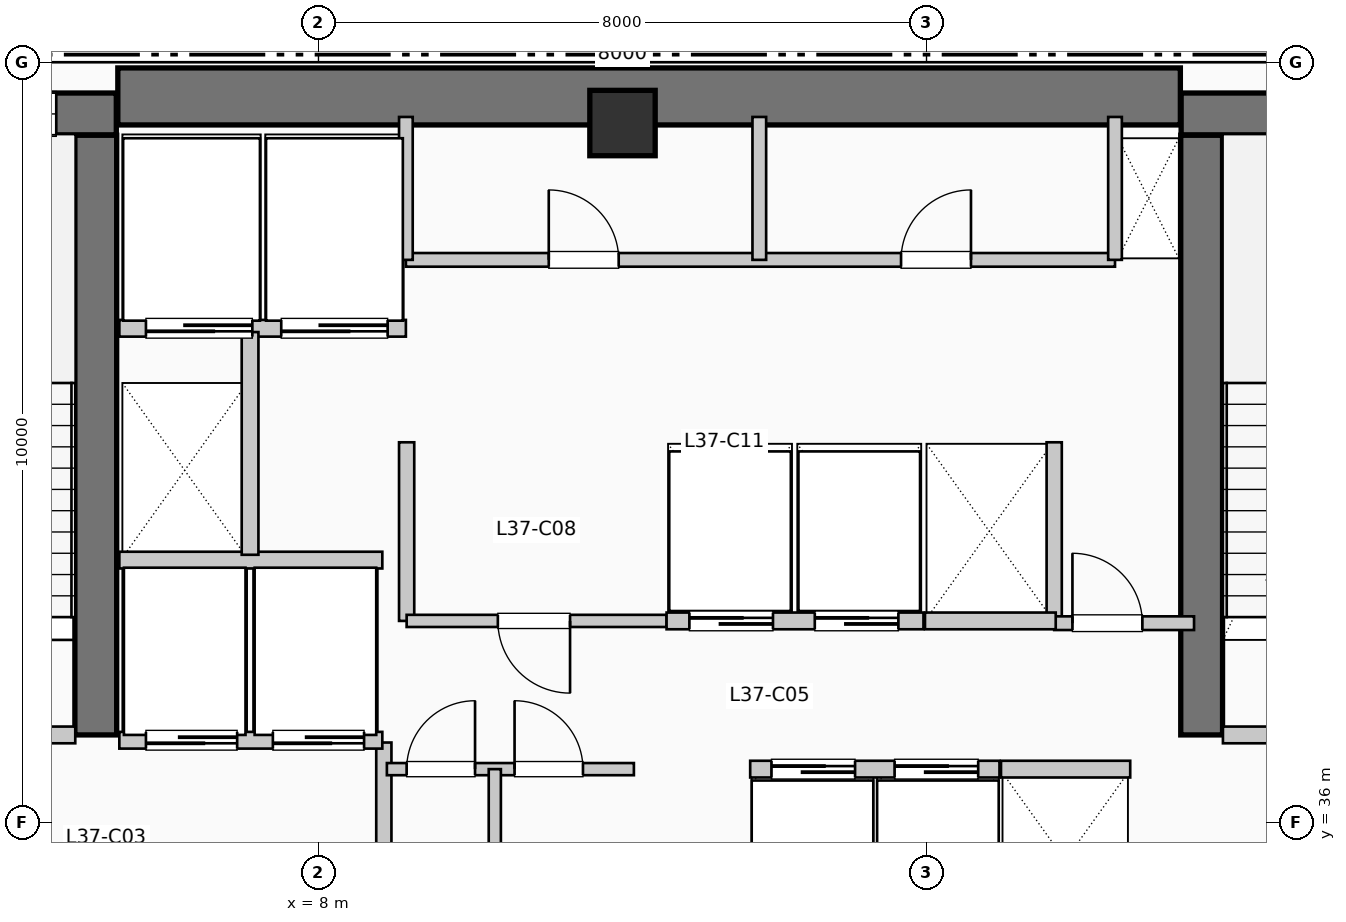
"""IFC4 building model, lengths in metres.
Left out: names, types, materials, properties, quantities, classifications, styles, units other than length and angle.
Written with IfcOpenShell. Run it as: python <this file> out.ifc"""

import sys

from ifc_helpers import new_model, si_unit, direction, frame, frame_2d, origin, origin_2d, place, context, subcontext, project, spatial, rectangle, extrude, element, fill, save


model = new_model("IFC4")
c1 = context("Model", 3, precision=1e-05, world=origin(), true_north=direction((0.0, 1.0)))
c2 = subcontext(c1, "Body", "Model", "MODEL_VIEW")
j1 = project(units=[si_unit("LENGTHUNIT", "METRE"), si_unit("PLANEANGLEUNIT", "RADIAN")], contexts=[c1])
p1 = place(None, origin())
s1 = spatial("IfcSite", under=j1, at=p1, CompositionType="ELEMENT")
p2 = place(p1, origin())
s2 = spatial("IfcBuilding", under=s1, at=p2, CompositionType="ELEMENT")
p3 = place(p2, frame((0.0, 0.0, 154.77)))
s3 = spatial("IfcBuildingStorey", under=s2, at=p3, CompositionType="ELEMENT", Elevation=154.77)
p4 = place(p3, frame((5.36, 45.55, 0.0), z_axis=(0.0, 0.0, 1.0), x_axis=(1.0, 0.0, 0.0)))
e1 = element("IfcWall", 1, at=p4, inside=s3, PredefinedType="SHEAR", context=c2, shape_type="SweptSolid", body=[
    extrude(rectangle(XDim=13.98, YDim=0.75, at=frame_2d((6.99, 0.0))), origin(), (0.0, 0.0, 1.0), 3.96),
])
p5 = place(p3, frame((5.07, 37.15, 0.0), z_axis=(0.0, 0.0, 1.0), x_axis=(0.0, 1.0, 0.0)))
e2 = element("IfcWall", 2, at=p5, inside=s3, PredefinedType="SHEAR", context=c2, shape_type="SweptSolid", body=[
    extrude(rectangle(XDim=7.89, YDim=0.55, at=frame_2d((3.945, 0.0))), origin(), (0.0, 0.0, 1.0), 3.96),
])
p6 = place(p3, frame((1.1, 45.32, 0.0), z_axis=(0.0, 0.0, 1.0), x_axis=(1.0, 0.0, 0.0)))
e3 = element("IfcWall", 3, at=p6, inside=s3, PredefinedType="SHEAR", context=c2, shape_type="SweptSolid", body=[
    extrude(rectangle(XDim=4.24, YDim=0.55, at=frame_2d((2.12, 0.0))), origin(), (0.0, 0.0, 1.0), 3.96),
])
p7 = place(p6, frame((2.05, 0.0, 1.05)))
e4 = element("IfcOpeningElement", 4, at=p7, cuts=e3, PredefinedType="OPENING", context=c2, shape_type="SweptSolid", body=[
    extrude(rectangle(XDim=1.4, YDim=1.8, at=frame_2d((0.7, 0.9))), frame((0.0, 0.285, 0.0), z_axis=(0.0, -1.0, 0.0), x_axis=(1.0, 0.0, 0.0)), (0.0, 0.0, 1.0), 0.57),
])
p8 = place(p3, frame((19.62, 37.15, 0.0), z_axis=(0.0, 0.0, 1.0), x_axis=(0.0, 1.0, 0.0)))
e5 = element("IfcWall", 5, at=p8, inside=s3, PredefinedType="SHEAR", context=c2, shape_type="SweptSolid", body=[
    extrude(rectangle(XDim=7.89, YDim=0.55, at=frame_2d((3.945, 0.0))), origin(), (0.0, 0.0, 1.0), 3.96),
])
p9 = place(p3, frame((19.35, 45.32, 0.0), z_axis=(0.0, 0.0, 1.0), x_axis=(1.0, 0.0, 0.0)))
e6 = element("IfcWall", 6, at=p9, inside=s3, PredefinedType="SHEAR", context=c2, shape_type="SweptSolid", body=[
    extrude(rectangle(XDim=3.69, YDim=0.55, at=frame_2d((1.845, 0.0))), origin(), (0.0, 0.0, 1.0), 3.96),
])
p10 = place(p9, frame((1.15, 0.0, 1.05)))
e7 = element("IfcOpeningElement", 7, at=p10, cuts=e6, PredefinedType="OPENING", context=c2, shape_type="SweptSolid", body=[
    extrude(rectangle(XDim=1.4, YDim=1.8, at=frame_2d((0.7, 0.9))), frame((0.0, 0.285, 0.0), z_axis=(0.0, -1.0, 0.0), x_axis=(1.0, 0.0, 0.0)), (0.0, 0.0, 1.0), 0.57),
])
p11 = place(p3, frame((12.0, 45.2, 0.0), z_axis=(0.0, 0.0, 1.0), x_axis=(1.0, 0.0, 0.0)))
e8 = element("IfcColumn", 8, at=p11, inside=s3, PredefinedType="COLUMN", context=c2, shape_type="SweptSolid", body=[
    extrude(rectangle(XDim=0.86, YDim=0.86, at=origin_2d()), origin(), (0.0, 0.0, 1.0), 3.96),
])
p12 = place(p3, frame((1.65, 37.15, 0.0), z_axis=(0.0, 0.0, 1.0), x_axis=(1.0, 0.0, 0.0)))
e9 = element("IfcWall", 9, at=p12, inside=s3, PredefinedType="PARTITIONING", context=c2, shape_type="SweptSolid", body=[
    extrude(rectangle(XDim=3.15, YDim=0.22, at=frame_2d((1.575, 0.0))), origin(), (0.0, 0.0, 1.0), 3.71),
])
p13 = place(p12, frame((2.05, 0.0, 0.0), z_axis=(0.0, 0.0, 1.0), x_axis=(-1.0, 0.0, 0.0)))
e10 = element("IfcOpeningElement", 10, at=p13, cuts=e9, PredefinedType="OPENING", context=c2, shape_type="SweptSolid", body=[
    extrude(rectangle(XDim=1.05, YDim=2.15, at=frame_2d((0.525, 1.075))), frame((0.0, 0.12, 0.0), z_axis=(0.0, -1.0, 0.0), x_axis=(1.0, 0.0, 0.0)), (0.0, 0.0, 1.0), 0.24),
])
p14 = place(p3, frame((8.86, 34.55, 0.0), z_axis=(0.0, 0.0, 1.0), x_axis=(0.0, 1.0, 0.0)))
e11 = element("IfcWall", 11, at=p14, inside=s3, PredefinedType="PARTITIONING", context=c2, shape_type="SweptSolid", body=[
    extrude(rectangle(XDim=2.5, YDim=0.2, at=frame_2d((1.25, 0.0))), origin(), (0.0, 0.0, 1.0), 3.71),
])
p15 = place(p3, frame((19.9, 37.15, 0.0), z_axis=(0.0, 0.0, 1.0), x_axis=(1.0, 0.0, 0.0)))
e12 = element("IfcWall", 12, at=p15, inside=s3, PredefinedType="PARTITIONING", context=c2, shape_type="SweptSolid", body=[
    extrude(rectangle(XDim=3.15, YDim=0.22, at=frame_2d((1.575, 0.0))), origin(), (0.0, 0.0, 1.0), 3.71),
])
p16 = place(p15, frame((2.05, 0.0, 0.0), z_axis=(0.0, 0.0, 1.0), x_axis=(-1.0, 0.0, 0.0)))
e13 = element("IfcOpeningElement", 13, at=p16, cuts=e12, PredefinedType="OPENING", context=c2, shape_type="SweptSolid", body=[
    extrude(rectangle(XDim=1.05, YDim=2.15, at=frame_2d((0.525, 1.075))), frame((0.0, 0.12, 0.0), z_axis=(0.0, -1.0, 0.0), x_axis=(1.0, 0.0, 0.0)), (0.0, 0.0, 1.0), 0.24),
])
p17 = place(p3, frame((5.38, 37.08, 0.0), z_axis=(0.0, 0.0, 1.0), x_axis=(1.0, 0.0, 0.0)))
e14 = element("IfcWall", 14, at=p17, inside=s3, PredefinedType="PARTITIONING", context=c2, shape_type="SweptSolid", body=[
    extrude(rectangle(XDim=3.46, YDim=0.22, at=frame_2d((1.73, 0.0))), origin(), (0.0, 0.0, 1.0), 3.71),
])
p18 = place(p17, frame((1.55, 0.0, 0.0), z_axis=(0.0, 0.0, 1.0), x_axis=(-1.0, 0.0, 0.0)))
e15 = element("IfcOpeningElement", 15, at=p18, cuts=e14, PredefinedType="OPENING", context=c2, shape_type="SweptSolid", body=[
    extrude(rectangle(XDim=1.2, YDim=2.2, at=frame_2d((0.6, 1.1))), frame((0.0, 0.12, 0.0), z_axis=(0.0, -1.0, 0.0), x_axis=(1.0, 0.0, 0.0)), (0.0, 0.0, 1.0), 0.24),
])
p19 = place(p17, frame((3.22, 0.0, 0.0), z_axis=(0.0, 0.0, 1.0), x_axis=(-1.0, 0.0, 0.0)))
e16 = element("IfcOpeningElement", 16, at=p19, cuts=e14, PredefinedType="OPENING", context=c2, shape_type="SweptSolid", body=[
    extrude(rectangle(XDim=1.2, YDim=2.2, at=frame_2d((0.6, 1.1))), frame((0.0, 0.12, 0.0), z_axis=(0.0, -1.0, 0.0), x_axis=(1.0, 0.0, 0.0)), (0.0, 0.0, 1.0), 0.24),
])
p20 = place(p3, frame((5.38, 39.45, 0.0), z_axis=(0.0, 0.0, 1.0), x_axis=(1.0, 0.0, 0.0)))
e17 = element("IfcWall", 17, at=p20, inside=s3, PredefinedType="PARTITIONING", context=c2, shape_type="SweptSolid", body=[
    extrude(rectangle(XDim=3.46, YDim=0.22, at=frame_2d((1.73, 0.0))), origin(), (0.0, 0.0, 1.0), 3.71),
])
p21 = place(p3, frame((5.38, 42.5, 0.0), z_axis=(0.0, 0.0, 1.0), x_axis=(1.0, 0.0, 0.0)))
e18 = element("IfcWall", 18, at=p21, inside=s3, PredefinedType="PARTITIONING", context=c2, shape_type="SweptSolid", body=[
    extrude(rectangle(XDim=3.77, YDim=0.22, at=frame_2d((1.885, 0.0))), origin(), (0.0, 0.0, 1.0), 3.71),
])
p22 = place(p21, frame((1.75, 0.0, 0.0), z_axis=(0.0, 0.0, 1.0), x_axis=(-1.0, 0.0, 0.0)))
e19 = element("IfcOpeningElement", 19, at=p22, cuts=e18, PredefinedType="OPENING", context=c2, shape_type="SweptSolid", body=[
    extrude(rectangle(XDim=1.4, YDim=2.2, at=frame_2d((0.7, 1.1))), frame((0.0, 0.12, 0.0), z_axis=(0.0, -1.0, 0.0), x_axis=(1.0, 0.0, 0.0)), (0.0, 0.0, 1.0), 0.24),
])
p23 = place(p21, frame((3.53, 0.0, 0.0), z_axis=(0.0, 0.0, 1.0), x_axis=(-1.0, 0.0, 0.0)))
e20 = element("IfcOpeningElement", 20, at=p23, cuts=e18, PredefinedType="OPENING", context=c2, shape_type="SweptSolid", body=[
    extrude(rectangle(XDim=1.4, YDim=2.2, at=frame_2d((0.7, 1.1))), frame((0.0, 0.12, 0.0), z_axis=(0.0, -1.0, 0.0), x_axis=(1.0, 0.0, 0.0)), (0.0, 0.0, 1.0), 0.24),
])
p24 = place(p3, frame((7.1, 39.52, 0.0), z_axis=(0.0, 0.0, 1.0), x_axis=(0.0, 1.0, 0.0)))
e21 = element("IfcWall", 21, at=p24, inside=s3, PredefinedType="PARTITIONING", context=c2, shape_type="SweptSolid", body=[
    extrude(rectangle(XDim=2.93, YDim=0.22, at=frame_2d((1.465, 0.0))), origin(), (0.0, 0.0, 1.0), 3.71),
])
for number, where, z_axis, x_axis in (
    (22, (9.16, 38.65, 0.0), (0.0, 0.0, 1.0), (0.0, 1.0, 0.0)),
    (23, (17.68, 38.65, 0.0), (0.0, 0.0, 1.0), (0.0, 1.0, 0.0)),
):
    element("IfcWall", number, at=place(p3, frame(where, z_axis=z_axis, x_axis=x_axis)), inside=s3, PredefinedType="PARTITIONING", context=c2, shape_type="SweptSolid", body=[
        extrude(rectangle(XDim=2.35, YDim=0.2, at=frame_2d((1.175, 0.0))), origin(), (0.0, 0.0, 1.0), 3.71),
    ])
p25 = place(p3, frame((17.68, 38.62, 0.0), z_axis=(0.0, 0.0, 1.0), x_axis=(1.0, 0.0, 0.0)))
e24 = element("IfcWall", 24, at=p25, inside=s3, PredefinedType="PARTITIONING", context=c2, shape_type="SweptSolid", body=[
    extrude(rectangle(XDim=1.84, YDim=0.18, at=frame_2d((0.92, 0.0))), origin(), (0.0, 0.0, 1.0), 3.71),
])
p26 = place(p25, frame((0.24, 0.0, 0.0)))
e25 = element("IfcOpeningElement", 25, at=p26, cuts=e24, PredefinedType="OPENING", context=c2, shape_type="SweptSolid", body=[
    extrude(rectangle(XDim=0.92, YDim=2.1, at=frame_2d((0.46, 1.05))), frame((0.0, 0.1, 0.0), z_axis=(0.0, -1.0, 0.0), x_axis=(1.0, 0.0, 0.0)), (0.0, 0.0, 1.0), 0.2),
])
p27 = place(p3, frame((8.9, 36.7, 0.0), z_axis=(0.0, 0.0, 1.0), x_axis=(1.0, 0.0, 0.0)))
e26 = element("IfcWall", 26, at=p27, inside=s3, PredefinedType="PARTITIONING", context=c2, shape_type="SweptSolid", body=[
    extrude(rectangle(XDim=3.25, YDim=0.16, at=frame_2d((1.625, 0.0))), origin(), (0.0, 0.0, 1.0), 3.71),
])
p28 = place(p27, frame((0.26, 0.0, 0.0)))
e27 = element("IfcOpeningElement", 27, at=p28, cuts=e26, PredefinedType="OPENING", context=c2, shape_type="SweptSolid", body=[
    extrude(rectangle(XDim=0.9, YDim=2.15, at=frame_2d((0.45, 1.075))), frame((0.0, 0.09, 0.0), z_axis=(0.0, -1.0, 0.0), x_axis=(1.0, 0.0, 0.0)), (0.0, 0.0, 1.0), 0.18),
])
p29 = place(p27, frame((1.68, 0.0, 0.0)))
e28 = element("IfcOpeningElement", 28, at=p29, cuts=e26, PredefinedType="OPENING", context=c2, shape_type="SweptSolid", body=[
    extrude(rectangle(XDim=0.9, YDim=2.15, at=frame_2d((0.45, 1.075))), frame((0.0, 0.09, 0.0), z_axis=(0.0, -1.0, 0.0), x_axis=(1.0, 0.0, 0.0)), (0.0, 0.0, 1.0), 0.18),
])
p30 = place(p3, frame((10.32, 34.55, 0.0), z_axis=(0.0, 0.0, 1.0), x_axis=(0.0, 1.0, 0.0)))
e29 = element("IfcWall", 29, at=p30, inside=s3, PredefinedType="PARTITIONING", context=c2, shape_type="SweptSolid", body=[
    extrude(rectangle(XDim=2.15, YDim=0.16, at=frame_2d((1.075, 0.0))), origin(), (0.0, 0.0, 1.0), 3.71),
])
p31 = place(p3, frame((9.16, 38.65, 0.0), z_axis=(0.0, 0.0, 1.0), x_axis=(1.0, 0.0, 0.0)))
e30 = element("IfcWall", 30, at=p31, inside=s3, PredefinedType="PARTITIONING", context=c2, shape_type="SweptSolid", body=[
    extrude(rectangle(XDim=3.42, YDim=0.16, at=frame_2d((1.71, 0.0))), origin(), (0.0, 0.0, 1.0), 3.71),
])
p32 = place(p31, frame((2.15, 0.0, 0.0), z_axis=(0.0, 0.0, 1.0), x_axis=(-1.0, 0.0, 0.0)))
e31 = element("IfcOpeningElement", 31, at=p32, cuts=e30, PredefinedType="OPENING", context=c2, shape_type="SweptSolid", body=[
    extrude(rectangle(XDim=0.95, YDim=2.15, at=frame_2d((0.475, 1.075))), frame((0.0, 0.09, 0.0), z_axis=(0.0, -1.0, 0.0), x_axis=(1.0, 0.0, 0.0)), (0.0, 0.0, 1.0), 0.18),
])
p33 = place(p3, frame((13.68, 36.7, 0.0), z_axis=(0.0, 0.0, 1.0), x_axis=(1.0, 0.0, 0.0)))
e32 = element("IfcWall", 32, at=p33, inside=s3, PredefinedType="PARTITIONING", context=c2, shape_type="SweptSolid", body=[
    extrude(rectangle(XDim=3.28, YDim=0.22, at=frame_2d((1.64, 0.0))), origin(), (0.0, 0.0, 1.0), 3.71),
])
p34 = place(p33, frame((0.28, 0.0, 0.0)))
e33 = element("IfcOpeningElement", 33, at=p34, cuts=e32, PredefinedType="OPENING", context=c2, shape_type="SweptSolid", body=[
    extrude(rectangle(XDim=1.1, YDim=2.2, at=frame_2d((0.55, 1.1))), frame((0.0, 0.12, 0.0), z_axis=(0.0, -1.0, 0.0), x_axis=(1.0, 0.0, 0.0)), (0.0, 0.0, 1.0), 0.24),
])
p35 = place(p33, frame((1.9, 0.0, 0.0)))
e34 = element("IfcOpeningElement", 34, at=p35, cuts=e32, PredefinedType="OPENING", context=c2, shape_type="SweptSolid", body=[
    extrude(rectangle(XDim=1.1, YDim=2.2, at=frame_2d((0.55, 1.1))), frame((0.0, 0.12, 0.0), z_axis=(0.0, -1.0, 0.0), x_axis=(1.0, 0.0, 0.0)), (0.0, 0.0, 1.0), 0.24),
])
p36 = place(p3, frame((12.58, 38.65, 0.0), z_axis=(0.0, 0.0, 1.0), x_axis=(1.0, 0.0, 0.0)))
e35 = element("IfcWall", 35, at=p36, inside=s3, PredefinedType="PARTITIONING", context=c2, shape_type="SweptSolid", body=[
    extrude(rectangle(XDim=3.38, YDim=0.22, at=frame_2d((1.69, 0.0))), origin(), (0.0, 0.0, 1.0), 3.71),
])
p37 = place(p36, frame((0.3, 0.0, 0.0)))
e36 = element("IfcOpeningElement", 36, at=p37, cuts=e35, PredefinedType="OPENING", context=c2, shape_type="SweptSolid", body=[
    extrude(rectangle(XDim=1.1, YDim=2.2, at=frame_2d((0.55, 1.1))), frame((0.0, 0.12, 0.0), z_axis=(0.0, -1.0, 0.0), x_axis=(1.0, 0.0, 0.0)), (0.0, 0.0, 1.0), 0.24),
])
p38 = place(p36, frame((1.95, 0.0, 0.0)))
e37 = element("IfcOpeningElement", 37, at=p38, cuts=e35, PredefinedType="OPENING", context=c2, shape_type="SweptSolid", body=[
    extrude(rectangle(XDim=1.1, YDim=2.2, at=frame_2d((0.55, 1.1))), frame((0.0, 0.12, 0.0), z_axis=(0.0, -1.0, 0.0), x_axis=(1.0, 0.0, 0.0)), (0.0, 0.0, 1.0), 0.24),
])
p39 = place(p3, frame((16.98, 36.7, 0.0), z_axis=(0.0, 0.0, 1.0), x_axis=(1.0, 0.0, 0.0)))
e38 = element("IfcWall", 38, at=p39, inside=s3, PredefinedType="PARTITIONING", context=c2, shape_type="SweptSolid", body=[
    extrude(rectangle(XDim=1.7, YDim=0.22, at=frame_2d((0.85, 0.0))), origin(), (0.0, 0.0, 1.0), 3.71),
])
p40 = place(p3, frame((15.98, 38.65, 0.0), z_axis=(0.0, 0.0, 1.0), x_axis=(1.0, 0.0, 0.0)))
e39 = element("IfcWall", 39, at=p40, inside=s3, PredefinedType="PARTITIONING", context=c2, shape_type="SweptSolid", body=[
    extrude(rectangle(XDim=1.72, YDim=0.22, at=frame_2d((0.86, 0.0))), origin(), (0.0, 0.0, 1.0), 3.71),
])
p41 = place(p3, frame((9.15, 43.4, 0.0), z_axis=(0.0, 0.0, 1.0), x_axis=(1.0, 0.0, 0.0)))
e40 = element("IfcWall", 40, at=p41, inside=s3, PredefinedType="PLUMBINGWALL", context=c2, shape_type="SweptSolid", body=[
    extrude(rectangle(XDim=9.33, YDim=0.18, at=frame_2d((4.665, 0.0))), origin(), (0.0, 0.0, 1.0), 3.71),
])
p42 = place(p41, frame((1.88, 0.0, 0.0)))
e41 = element("IfcOpeningElement", 41, at=p42, cuts=e40, PredefinedType="OPENING", context=c2, shape_type="SweptSolid", body=[
    extrude(rectangle(XDim=0.92, YDim=2.1, at=frame_2d((0.46, 1.05))), frame((0.0, 0.1, 0.0), z_axis=(0.0, -1.0, 0.0), x_axis=(1.0, 0.0, 0.0)), (0.0, 0.0, 1.0), 0.2),
])
p43 = place(p41, frame((6.515, 0.0, 0.0)))
e42 = element("IfcOpeningElement", 42, at=p43, cuts=e40, PredefinedType="OPENING", context=c2, shape_type="SweptSolid", body=[
    extrude(rectangle(XDim=0.92, YDim=2.1, at=frame_2d((0.46, 1.05))), frame((0.0, 0.1, 0.0), z_axis=(0.0, -1.0, 0.0), x_axis=(1.0, 0.0, 0.0)), (0.0, 0.0, 1.0), 0.2),
])
for number, where, z_axis, x_axis in (
    (43, (9.15, 43.4, 0.0), (0.0, 0.0, 1.0), (0.0, 1.0, 0.0)),
    (44, (18.48, 43.4, 0.0), (0.0, 0.0, 1.0), (0.0, 1.0, 0.0)),
    (45, (13.8, 43.4, 0.0), (0.0, 0.0, 1.0), (0.0, 1.0, 0.0)),
):
    element("IfcWall", number, at=place(p3, frame(where, z_axis=z_axis, x_axis=x_axis)), inside=s3, PredefinedType="PLUMBINGWALL", context=c2, shape_type="SweptSolid", body=[
        extrude(rectangle(XDim=1.88, YDim=0.18, at=frame_2d((0.94, 0.0))), origin(), (0.0, 0.0, 1.0), 3.71),
    ])
p44 = place(p7, origin())
e46 = element("IfcWindow", 46, at=p44, inside=s3, PartitioningType="SINGLE_PANEL", PredefinedType="WINDOW", context=c2, shape_type="SweptSolid", body=[
    extrude(rectangle(XDim=1.4, YDim=1.8, at=frame_2d((0.7, 0.9))), frame((0.0, 0.03, 0.0), z_axis=(0.0, -1.0, 0.0), x_axis=(1.0, 0.0, 0.0)), (0.0, 0.0, 1.0), 0.06),
])
fill(e4, e46)
p45 = place(p18, origin())
e47 = element("IfcDoor", 47, at=p45, inside=s3, OperationType="SLIDING_TO_RIGHT", PredefinedType="DOOR", context=c2, shape_type="SweptSolid", body=[
    extrude(rectangle(XDim=1.2, YDim=2.2, at=frame_2d((0.6, 1.1))), frame((0.0, 0.025, 0.0), z_axis=(0.0, -1.0, 0.0), x_axis=(1.0, 0.0, 0.0)), (0.0, 0.0, 1.0), 0.05),
])
fill(e15, e47)
p46 = place(p19, origin())
e48 = element("IfcDoor", 48, at=p46, inside=s3, OperationType="SLIDING_TO_RIGHT", PredefinedType="DOOR", context=c2, shape_type="SweptSolid", body=[
    extrude(rectangle(XDim=1.2, YDim=2.2, at=frame_2d((0.6, 1.1))), frame((0.0, 0.025, 0.0), z_axis=(0.0, -1.0, 0.0), x_axis=(1.0, 0.0, 0.0)), (0.0, 0.0, 1.0), 0.05),
])
fill(e16, e48)
p47 = place(p22, origin())
e49 = element("IfcDoor", 49, at=p47, inside=s3, OperationType="SLIDING_TO_LEFT", PredefinedType="DOOR", context=c2, shape_type="SweptSolid", body=[
    extrude(rectangle(XDim=1.4, YDim=2.2, at=frame_2d((0.7, 1.1))), frame((0.0, 0.025, 0.0), z_axis=(0.0, -1.0, 0.0), x_axis=(1.0, 0.0, 0.0)), (0.0, 0.0, 1.0), 0.05),
])
fill(e19, e49)
p48 = place(p23, origin())
e50 = element("IfcDoor", 50, at=p48, inside=s3, OperationType="SLIDING_TO_LEFT", PredefinedType="DOOR", context=c2, shape_type="SweptSolid", body=[
    extrude(rectangle(XDim=1.4, YDim=2.2, at=frame_2d((0.7, 1.1))), frame((0.0, 0.025, 0.0), z_axis=(0.0, -1.0, 0.0), x_axis=(1.0, 0.0, 0.0)), (0.0, 0.0, 1.0), 0.05),
])
fill(e20, e50)
p49 = place(p26, origin())
e51 = element("IfcDoor", 51, at=p49, inside=s3, OperationType="SINGLE_SWING_LEFT", PredefinedType="DOOR", context=c2, shape_type="SweptSolid", body=[
    extrude(rectangle(XDim=0.92, YDim=2.1, at=frame_2d((0.46, 1.05))), frame((0.0, 0.025, 0.0), z_axis=(0.0, -1.0, 0.0), x_axis=(1.0, 0.0, 0.0)), (0.0, 0.0, 1.0), 0.05),
])
fill(e25, e51)
p50 = place(p28, origin())
e52 = element("IfcDoor", 52, at=p50, inside=s3, OperationType="SINGLE_SWING_RIGHT", PredefinedType="DOOR", context=c2, shape_type="SweptSolid", body=[
    extrude(rectangle(XDim=0.9, YDim=2.15, at=frame_2d((0.45, 1.075))), frame((0.0, 0.025, 0.0), z_axis=(0.0, -1.0, 0.0), x_axis=(1.0, 0.0, 0.0)), (0.0, 0.0, 1.0), 0.05),
])
fill(e27, e52)
p51 = place(p29, origin())
e53 = element("IfcDoor", 53, at=p51, inside=s3, OperationType="SINGLE_SWING_LEFT", PredefinedType="DOOR", context=c2, shape_type="SweptSolid", body=[
    extrude(rectangle(XDim=0.9, YDim=2.15, at=frame_2d((0.45, 1.075))), frame((0.0, 0.025, 0.0), z_axis=(0.0, -1.0, 0.0), x_axis=(1.0, 0.0, 0.0)), (0.0, 0.0, 1.0), 0.05),
])
fill(e28, e53)
p52 = place(p32, origin())
e54 = element("IfcDoor", 54, at=p52, inside=s3, OperationType="SINGLE_SWING_RIGHT", PredefinedType="DOOR", context=c2, shape_type="SweptSolid", body=[
    extrude(rectangle(XDim=0.95, YDim=2.15, at=frame_2d((0.475, 1.075))), frame((0.0, 0.025, 0.0), z_axis=(0.0, -1.0, 0.0), x_axis=(1.0, 0.0, 0.0)), (0.0, 0.0, 1.0), 0.05),
])
fill(e31, e54)
p53 = place(p34, origin())
e55 = element("IfcDoor", 55, at=p53, inside=s3, OperationType="SLIDING_TO_RIGHT", PredefinedType="DOOR", context=c2, shape_type="SweptSolid", body=[
    extrude(rectangle(XDim=1.1, YDim=2.2, at=frame_2d((0.55, 1.1))), frame((0.0, 0.025, 0.0), z_axis=(0.0, -1.0, 0.0), x_axis=(1.0, 0.0, 0.0)), (0.0, 0.0, 1.0), 0.05),
])
fill(e33, e55)
p54 = place(p35, origin())
e56 = element("IfcDoor", 56, at=p54, inside=s3, OperationType="SLIDING_TO_RIGHT", PredefinedType="DOOR", context=c2, shape_type="SweptSolid", body=[
    extrude(rectangle(XDim=1.1, YDim=2.2, at=frame_2d((0.55, 1.1))), frame((0.0, 0.025, 0.0), z_axis=(0.0, -1.0, 0.0), x_axis=(1.0, 0.0, 0.0)), (0.0, 0.0, 1.0), 0.05),
])
fill(e34, e56)
p55 = place(p37, origin())
e57 = element("IfcDoor", 57, at=p55, inside=s3, OperationType="SLIDING_TO_RIGHT", PredefinedType="DOOR", context=c2, shape_type="SweptSolid", body=[
    extrude(rectangle(XDim=1.1, YDim=2.2, at=frame_2d((0.55, 1.1))), frame((0.0, 0.025, 0.0), z_axis=(0.0, -1.0, 0.0), x_axis=(1.0, 0.0, 0.0)), (0.0, 0.0, 1.0), 0.05),
])
fill(e36, e57)
p56 = place(p38, origin())
e58 = element("IfcDoor", 58, at=p56, inside=s3, OperationType="SLIDING_TO_RIGHT", PredefinedType="DOOR", context=c2, shape_type="SweptSolid", body=[
    extrude(rectangle(XDim=1.1, YDim=2.2, at=frame_2d((0.55, 1.1))), frame((0.0, 0.025, 0.0), z_axis=(0.0, -1.0, 0.0), x_axis=(1.0, 0.0, 0.0)), (0.0, 0.0, 1.0), 0.05),
])
fill(e37, e58)
p57 = place(p42, origin())
e59 = element("IfcDoor", 59, at=p57, inside=s3, OperationType="SINGLE_SWING_LEFT", PredefinedType="DOOR", context=c2, shape_type="SweptSolid", body=[
    extrude(rectangle(XDim=0.92, YDim=2.1, at=frame_2d((0.46, 1.05))), frame((0.0, 0.025, 0.0), z_axis=(0.0, -1.0, 0.0), x_axis=(1.0, 0.0, 0.0)), (0.0, 0.0, 1.0), 0.05),
])
fill(e41, e59)
p58 = place(p43, origin())
e60 = element("IfcDoor", 60, at=p58, inside=s3, OperationType="SINGLE_SWING_RIGHT", PredefinedType="DOOR", context=c2, shape_type="SweptSolid", body=[
    extrude(rectangle(XDim=0.92, YDim=2.1, at=frame_2d((0.46, 1.05))), frame((0.0, 0.025, 0.0), z_axis=(0.0, -1.0, 0.0), x_axis=(1.0, 0.0, 0.0)), (0.0, 0.0, 1.0), 0.05),
])
fill(e42, e60)
save(model, sys.argv[1])
